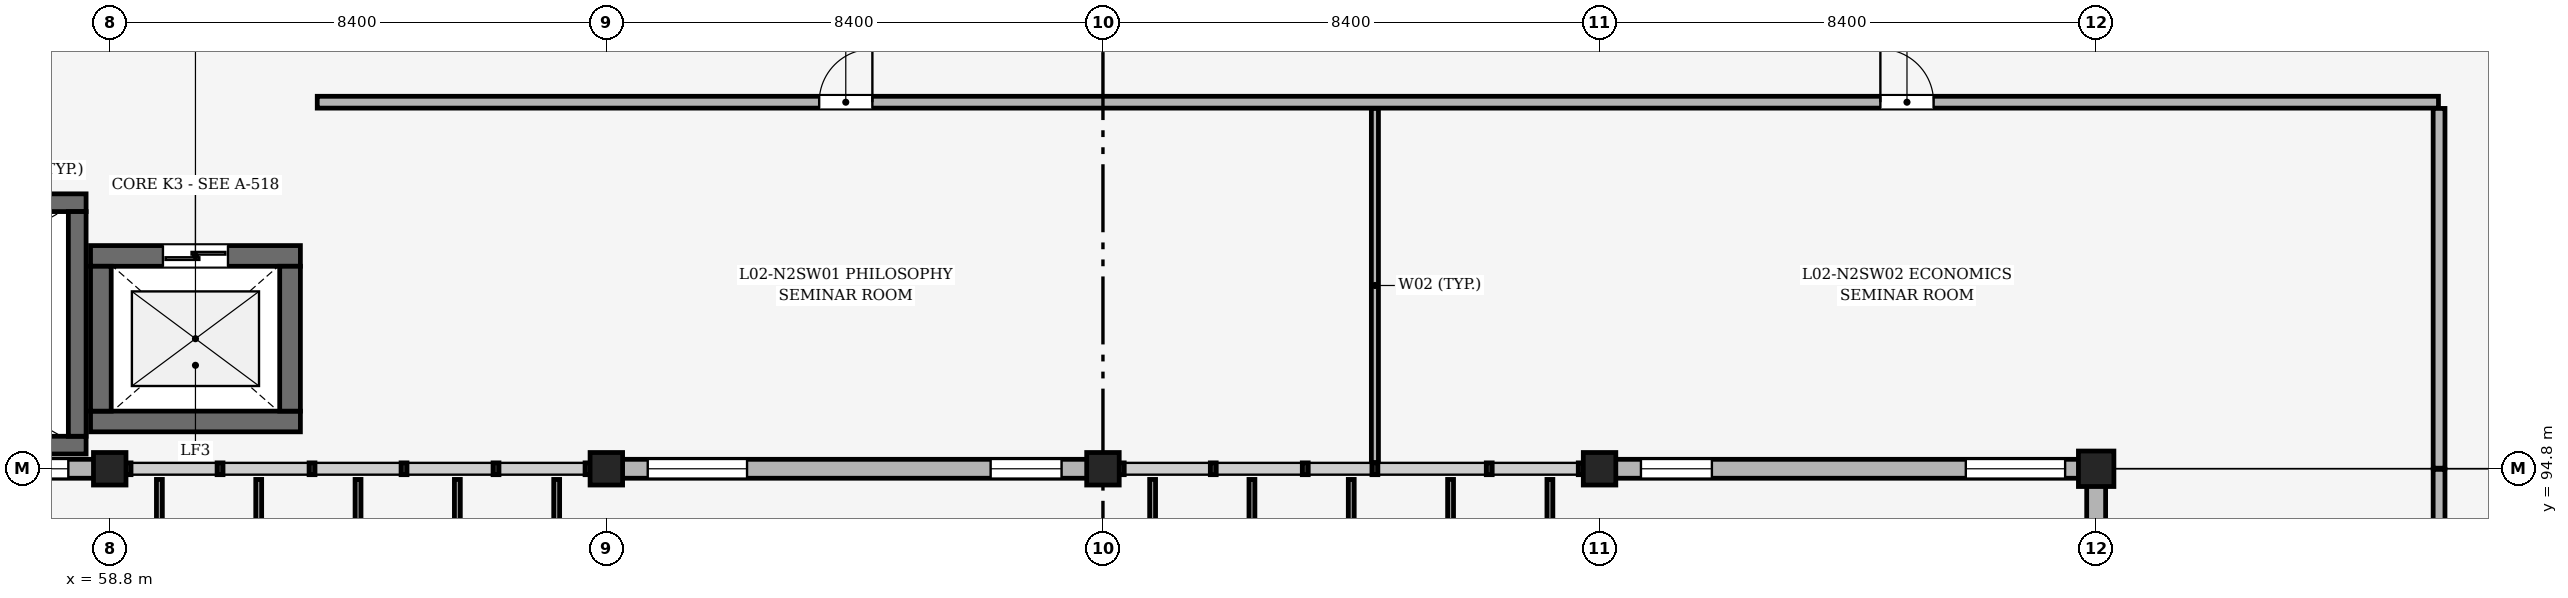
"""IFC4 building model, lengths in metres.
Left out: names, types, materials, properties, quantities, classifications, styles, units other than length and angle.
Written with IfcOpenShell. Run it as: python <this file> out.ifc"""

import sys

from ifc_helpers import new_model, si_unit, direction, frame, frame_2d, origin, origin_2d, place, context, subcontext, project, spatial, rectangle, extrude, element, fill, save


model = new_model("IFC4")
c1 = context("Model", 3, precision=1e-05, world=origin(), true_north=direction((0.0, 1.0)))
c2 = subcontext(c1, "Body", "Model", "MODEL_VIEW")
j1 = project(units=[si_unit("LENGTHUNIT", "METRE"), si_unit("PLANEANGLEUNIT", "RADIAN")], contexts=[c1])
p1 = place(None, origin())
s1 = spatial("IfcSite", under=j1, at=p1, CompositionType="ELEMENT")
p2 = place(p1, origin())
s2 = spatial("IfcBuilding", under=s1, at=p2, CompositionType="ELEMENT")
p3 = place(p2, frame((0.0, 0.0, 9.0)))
s3 = spatial("IfcBuildingStorey", under=s2, at=p3, CompositionType="ELEMENT", Elevation=9.0)
for number, where, z_axis, x_axis in (
    (1, (58.8, 94.8, 0.0), (0.0, 0.0, 1.0), (1.0, 0.0, 0.0)),
    (2, (67.2, 94.8, 0.0), (0.0, 0.0, 1.0), (1.0, 0.0, 0.0)),
    (3, (75.6, 94.8, 0.0), (0.0, 0.0, 1.0), (1.0, 0.0, 0.0)),
    (4, (84.0, 94.8, 0.0), (0.0, 0.0, 1.0), (1.0, 0.0, 0.0)),
):
    element("IfcColumn", number, at=place(p3, frame(where, z_axis=z_axis, x_axis=x_axis)), inside=s3, PredefinedType="COLUMN", context=c2, shape_type="SweptSolid", body=[
        extrude(rectangle(XDim=0.55, YDim=0.55, at=origin_2d()), origin(), (0.0, 0.0, 1.0), 4.2),
    ])
p4 = place(p3, frame((92.4, 94.8, 0.0), z_axis=(0.0, 0.0, 1.0), x_axis=(1.0, 0.0, 0.0)))
e5 = element("IfcColumn", 5, at=p4, inside=s3, PredefinedType="COLUMN", context=c2, shape_type="SweptSolid", body=[
    extrude(rectangle(XDim=0.6, YDim=0.6, at=origin_2d()), origin(), (0.0, 0.0, 1.0), 4.2),
])
p5 = place(p3, frame((50.65, 94.8, 0.0), z_axis=(0.0, 0.0, 1.0), x_axis=(1.0, 0.0, 0.0)))
e6 = element("IfcWall", 6, at=p5, inside=s3, PredefinedType="SOLIDWALL", context=c2, shape_type="SweptSolid", body=[
    extrude(rectangle(XDim=7.9, YDim=0.32, at=frame_2d((3.95, 0.0))), origin(), (0.0, 0.0, 1.0), 3.36),
])
p6 = place(p5, frame((0.45, 0.0, 0.9)))
e7 = element("IfcOpeningElement", 7, at=p6, cuts=e6, PredefinedType="OPENING", context=c2, shape_type="SweptSolid", body=[
    extrude(rectangle(XDim=1.2, YDim=1.5, at=frame_2d((0.6, 0.75))), frame((0.0, 0.17, 0.0), z_axis=(0.0, -1.0, 0.0), x_axis=(1.0, 0.0, 0.0)), (0.0, 0.0, 1.0), 0.34),
])
p7 = place(p5, frame((6.25, 0.0, 0.9)))
e8 = element("IfcOpeningElement", 8, at=p7, cuts=e6, PredefinedType="OPENING", context=c2, shape_type="SweptSolid", body=[
    extrude(rectangle(XDim=1.2, YDim=1.8, at=frame_2d((0.6, 0.9))), frame((0.0, 0.17, 0.0), z_axis=(0.0, -1.0, 0.0), x_axis=(1.0, 0.0, 0.0)), (0.0, 0.0, 1.0), 0.34),
])
p8 = place(p3, frame((67.45, 94.8, 0.0), z_axis=(0.0, 0.0, 1.0), x_axis=(1.0, 0.0, 0.0)))
e9 = element("IfcWall", 9, at=p8, inside=s3, PredefinedType="SOLIDWALL", context=c2, shape_type="SweptSolid", body=[
    extrude(rectangle(XDim=7.9, YDim=0.32, at=frame_2d((3.95, 0.0))), origin(), (0.0, 0.0, 1.0), 3.31),
])
p9 = place(p8, frame((0.45, 0.0, 0.9)))
e10 = element("IfcOpeningElement", 10, at=p9, cuts=e9, PredefinedType="OPENING", context=c2, shape_type="SweptSolid", body=[
    extrude(rectangle(XDim=1.68, YDim=2.26, at=frame_2d((0.84, 1.13))), frame((0.0, 0.17, 0.0), z_axis=(0.0, -1.0, 0.0), x_axis=(1.0, 0.0, 0.0)), (0.0, 0.0, 1.0), 0.34),
])
p10 = place(p8, frame((6.25, 0.0, 0.9)))
e11 = element("IfcOpeningElement", 11, at=p10, cuts=e9, PredefinedType="OPENING", context=c2, shape_type="SweptSolid", body=[
    extrude(rectangle(XDim=1.2, YDim=1.5, at=frame_2d((0.6, 0.75))), frame((0.0, 0.17, 0.0), z_axis=(0.0, -1.0, 0.0), x_axis=(1.0, 0.0, 0.0)), (0.0, 0.0, 1.0), 0.34),
])
p11 = place(p3, frame((84.25, 94.8, 0.0), z_axis=(0.0, 0.0, 1.0), x_axis=(1.0, 0.0, 0.0)))
e12 = element("IfcWall", 12, at=p11, inside=s3, PredefinedType="SOLIDWALL", context=c2, shape_type="SweptSolid", body=[
    extrude(rectangle(XDim=7.875, YDim=0.32, at=frame_2d((3.938, 0.0))), origin(), (0.0, 0.0, 1.0), 3.31),
])
p12 = place(p11, frame((0.45, 0.0, 0.9)))
e13 = element("IfcOpeningElement", 13, at=p12, cuts=e12, PredefinedType="OPENING", context=c2, shape_type="SweptSolid", body=[
    extrude(rectangle(XDim=1.2, YDim=1.8, at=frame_2d((0.6, 0.9))), frame((0.0, 0.17, 0.0), z_axis=(0.0, -1.0, 0.0), x_axis=(1.0, 0.0, 0.0)), (0.0, 0.0, 1.0), 0.34),
])
p13 = place(p11, frame((5.945, 0.0, 0.9)))
e14 = element("IfcOpeningElement", 14, at=p13, cuts=e12, PredefinedType="OPENING", context=c2, shape_type="SweptSolid", body=[
    extrude(rectangle(XDim=1.68, YDim=2.26, at=frame_2d((0.84, 1.13))), frame((0.0, 0.17, 0.0), z_axis=(0.0, -1.0, 0.0), x_axis=(1.0, 0.0, 0.0)), (0.0, 0.0, 1.0), 0.34),
])
p14 = place(p3, frame((92.4, 86.075, 0.0), z_axis=(0.0, 0.0, 1.0), x_axis=(0.0, 1.0, 0.0)))
e15 = element("IfcWall", 15, at=p14, inside=s3, PredefinedType="SOLIDWALL", context=c2, shape_type="SweptSolid", body=[
    extrude(rectangle(XDim=8.45, YDim=0.32, at=frame_2d((4.225, 0.0))), origin(), (0.0, 0.0, 1.0), 3.29),
])
p15 = place(p14, frame((3.025, 0.0, 0.9)))
e16 = element("IfcOpeningElement", 16, at=p15, cuts=e15, PredefinedType="OPENING", context=c2, shape_type="SweptSolid", body=[
    extrude(rectangle(XDim=2.4, YDim=1.8, at=frame_2d((1.2, 0.9))), frame((0.0, 0.17, 0.0), z_axis=(0.0, -1.0, 0.0), x_axis=(1.0, 0.0, 0.0)), (0.0, 0.0, 1.0), 0.34),
])
for number, where, z_axis, x_axis in (
    (17, (50.8, 95.2, 0.0), (0.0, 0.0, 1.0), (1.0, 0.0, 0.0)),
    (18, (50.8, 99.3, 0.0), (0.0, 0.0, 1.0), (1.0, 0.0, 0.0)),
):
    element("IfcWall", number, at=place(p3, frame(where, z_axis=z_axis, x_axis=x_axis)), inside=s3, PredefinedType="SHEAR", context=c2, shape_type="SweptSolid", body=[
        extrude(rectangle(XDim=7.6, YDim=0.3, at=frame_2d((3.8, 0.0))), origin(), (0.0, 0.0, 1.0), 4.025),
    ])
p16 = place(p3, frame((58.25, 95.35, 0.0), z_axis=(0.0, 0.0, 1.0), x_axis=(0.0, 1.0, 0.0)))
e19 = element("IfcWall", 19, at=p16, inside=s3, PredefinedType="SHEAR", context=c2, shape_type="SweptSolid", body=[
    extrude(rectangle(XDim=3.8, YDim=0.3, at=frame_2d((1.9, 0.0))), origin(), (0.0, 0.0, 1.0), 4.025),
])
p17 = place(p3, frame((58.475, 95.6, 0.0), z_axis=(0.0, 0.0, 1.0), x_axis=(1.0, 0.0, 0.0)))
e20 = element("IfcWall", 20, at=p17, inside=s3, PredefinedType="SHEAR", context=c2, shape_type="SweptSolid", body=[
    extrude(rectangle(XDim=3.55, YDim=0.35, at=frame_2d((1.775, 0.0))), origin(), (0.0, 0.0, 1.0), 3.92),
])
p18 = place(p3, frame((58.475, 98.4, 0.0), z_axis=(0.0, 0.0, 1.0), x_axis=(1.0, 0.0, 0.0)))
e21 = element("IfcWall", 21, at=p18, inside=s3, PredefinedType="SHEAR", context=c2, shape_type="SweptSolid", body=[
    extrude(rectangle(XDim=3.55, YDim=0.35, at=frame_2d((1.775, 0.0))), origin(), (0.0, 0.0, 1.0), 3.92),
])
p19 = place(p18, frame((1.225, 0.0, 0.0)))
e22 = element("IfcOpeningElement", 22, at=p19, cuts=e21, PredefinedType="OPENING", context=c2, shape_type="SweptSolid", body=[
    extrude(rectangle(XDim=1.1, YDim=2.2, at=frame_2d((0.55, 1.1))), frame((0.0, 0.185, 0.0), z_axis=(0.0, -1.0, 0.0), x_axis=(1.0, 0.0, 0.0)), (0.0, 0.0, 1.0), 0.37),
])
for number, where, z_axis, x_axis in (
    (23, (58.65, 95.775, 0.0), (0.0, 0.0, 1.0), (0.0, 1.0, 0.0)),
    (24, (61.85, 95.775, 0.0), (0.0, 0.0, 1.0), (0.0, 1.0, 0.0)),
):
    element("IfcWall", number, at=place(p3, frame(where, z_axis=z_axis, x_axis=x_axis)), inside=s3, PredefinedType="SHEAR", context=c2, shape_type="SweptSolid", body=[
        extrude(rectangle(XDim=2.45, YDim=0.35, at=frame_2d((1.225, 0.0))), origin(), (0.0, 0.0, 1.0), 3.92),
    ])
p20 = place(p3, frame((80.2, 94.905, 0.0), z_axis=(0.0, 0.0, 1.0), x_axis=(0.0, 1.0, 0.0)))
e25 = element("IfcWall", 25, at=p20, inside=s3, PredefinedType="PARTITIONING", context=c2, shape_type="SweptSolid", body=[
    extrude(rectangle(XDim=5.99, YDim=0.12, at=frame_2d((2.995, 0.0))), origin(), (0.0, 0.0, 1.0), 3.9),
])
p21 = place(p3, frame((62.31, 101.0, 0.0), z_axis=(0.0, 0.0, 1.0), x_axis=(1.0, 0.0, 0.0)))
e26 = element("IfcWall", 26, at=p21, inside=s3, PredefinedType="PARTITIONING", context=c2, shape_type="SweptSolid", body=[
    extrude(rectangle(XDim=35.88, YDim=0.2, at=frame_2d((17.94, 0.0))), origin(), (0.0, 0.0, 1.0), 3.48),
])
p22 = place(p21, frame((8.49, 0.0, 0.0)))
e27 = element("IfcOpeningElement", 27, at=p22, cuts=e26, PredefinedType="OPENING", context=c2, shape_type="SweptSolid", body=[
    extrude(rectangle(XDim=0.9, YDim=2.1, at=frame_2d((0.45, 1.05))), frame((0.0, 0.11, 0.0), z_axis=(0.0, -1.0, 0.0), x_axis=(1.0, 0.0, 0.0)), (0.0, 0.0, 1.0), 0.22),
])
p23 = place(p21, frame((26.44, 0.0, 0.0)))
e28 = element("IfcOpeningElement", 28, at=p23, cuts=e26, PredefinedType="OPENING", context=c2, shape_type="SweptSolid", body=[
    extrude(rectangle(XDim=0.9, YDim=2.1, at=frame_2d((0.45, 1.05))), frame((0.0, 0.11, 0.0), z_axis=(0.0, -1.0, 0.0), x_axis=(1.0, 0.0, 0.0)), (0.0, 0.0, 1.0), 0.22),
])
p24 = place(p3, frame((98.2, 94.81, 0.0), z_axis=(0.0, 0.0, 1.0), x_axis=(0.0, 1.0, 0.0)))
e29 = element("IfcWall", 29, at=p24, inside=s3, PredefinedType="PARTITIONING", context=c2, shape_type="SweptSolid", body=[
    extrude(rectangle(XDim=6.085, YDim=0.2, at=frame_2d((3.042, 0.0))), origin(), (0.0, 0.0, 1.0), 3.9),
])
p25 = place(p3, frame((98.2, 85.81, 0.0), z_axis=(0.0, 0.0, 1.0), x_axis=(0.0, 1.0, 0.0)))
e30 = element("IfcWall", 30, at=p25, inside=s3, PredefinedType="PARTITIONING", context=c2, shape_type="SweptSolid", body=[
    extrude(rectangle(XDim=8.98, YDim=0.2, at=frame_2d((4.49, 0.0))), origin(), (0.0, 0.0, 1.0), 3.9),
])
p26 = place(p25, frame((3.99, 0.0, 0.0)))
e31 = element("IfcOpeningElement", 31, at=p26, cuts=e30, PredefinedType="OPENING", context=c2, shape_type="SweptSolid", body=[
    extrude(rectangle(XDim=1.0, YDim=2.15, at=frame_2d((0.5, 1.075))), frame((0.0, 0.11, 0.0), z_axis=(0.0, -1.0, 0.0), x_axis=(1.0, 0.0, 0.0)), (0.0, 0.0, 1.0), 0.22),
])
p27 = place(p7, origin())
e32 = element("IfcWindow", 32, at=p27, inside=s3, PartitioningType="SINGLE_PANEL", PredefinedType="WINDOW", context=c2, shape_type="SweptSolid", body=[
    extrude(rectangle(XDim=1.2, YDim=1.8, at=frame_2d((0.6, 0.9))), frame((0.0, 0.03, 0.0), z_axis=(0.0, -1.0, 0.0), x_axis=(1.0, 0.0, 0.0)), (0.0, 0.0, 1.0), 0.06),
])
fill(e8, e32)
p28 = place(p9, origin())
e33 = element("IfcWindow", 33, at=p28, inside=s3, PartitioningType="SINGLE_PANEL", PredefinedType="WINDOW", context=c2, shape_type="SweptSolid", body=[
    extrude(rectangle(XDim=1.68, YDim=2.26, at=frame_2d((0.84, 1.13))), frame((0.0, 0.03, 0.0), z_axis=(0.0, -1.0, 0.0), x_axis=(1.0, 0.0, 0.0)), (0.0, 0.0, 1.0), 0.06),
])
fill(e10, e33)
p29 = place(p10, origin())
e34 = element("IfcWindow", 34, at=p29, inside=s3, PartitioningType="SINGLE_PANEL", PredefinedType="WINDOW", context=c2, shape_type="SweptSolid", body=[
    extrude(rectangle(XDim=1.2, YDim=1.5, at=frame_2d((0.6, 0.75))), frame((0.0, 0.03, 0.0), z_axis=(0.0, -1.0, 0.0), x_axis=(1.0, 0.0, 0.0)), (0.0, 0.0, 1.0), 0.06),
])
fill(e11, e34)
p30 = place(p12, origin())
e35 = element("IfcWindow", 35, at=p30, inside=s3, PartitioningType="SINGLE_PANEL", PredefinedType="WINDOW", context=c2, shape_type="SweptSolid", body=[
    extrude(rectangle(XDim=1.2, YDim=1.8, at=frame_2d((0.6, 0.9))), frame((0.0, 0.03, 0.0), z_axis=(0.0, -1.0, 0.0), x_axis=(1.0, 0.0, 0.0)), (0.0, 0.0, 1.0), 0.06),
])
fill(e13, e35)
p31 = place(p13, origin())
e36 = element("IfcWindow", 36, at=p31, inside=s3, PartitioningType="SINGLE_PANEL", PredefinedType="WINDOW", context=c2, shape_type="SweptSolid", body=[
    extrude(rectangle(XDim=1.68, YDim=2.26, at=frame_2d((0.84, 1.13))), frame((0.0, 0.03, 0.0), z_axis=(0.0, -1.0, 0.0), x_axis=(1.0, 0.0, 0.0)), (0.0, 0.0, 1.0), 0.06),
])
fill(e14, e36)
p32 = place(p19, origin())
e37 = element("IfcDoor", 37, at=p32, inside=s3, OperationType="DOUBLE_DOOR_SLIDING", PredefinedType="DOOR", context=c2, shape_type="SweptSolid", body=[
    extrude(rectangle(XDim=1.1, YDim=2.2, at=frame_2d((0.55, 1.1))), frame((0.0, 0.025, 0.0), z_axis=(0.0, -1.0, 0.0), x_axis=(1.0, 0.0, 0.0)), (0.0, 0.0, 1.0), 0.05),
])
fill(e22, e37)
p33 = place(p22, origin())
e38 = element("IfcDoor", 38, at=p33, inside=s3, OperationType="SINGLE_SWING_RIGHT", PredefinedType="DOOR", context=c2, shape_type="SweptSolid", body=[
    extrude(rectangle(XDim=0.9, YDim=2.1, at=frame_2d((0.45, 1.05))), frame((0.0, 0.025, 0.0), z_axis=(0.0, -1.0, 0.0), x_axis=(1.0, 0.0, 0.0)), (0.0, 0.0, 1.0), 0.05),
])
fill(e27, e38)
p34 = place(p23, origin())
e39 = element("IfcDoor", 39, at=p34, inside=s3, OperationType="SINGLE_SWING_LEFT", PredefinedType="DOOR", context=c2, shape_type="SweptSolid", body=[
    extrude(rectangle(XDim=0.9, YDim=2.1, at=frame_2d((0.45, 1.05))), frame((0.0, 0.025, 0.0), z_axis=(0.0, -1.0, 0.0), x_axis=(1.0, 0.0, 0.0)), (0.0, 0.0, 1.0), 0.05),
])
fill(e28, e39)
save(model, sys.argv[1])
